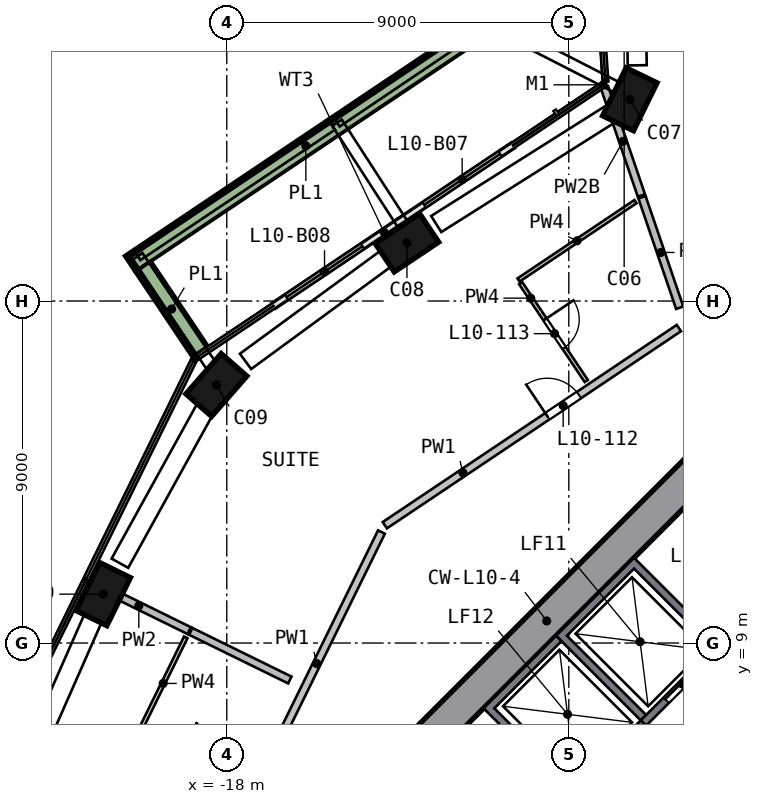
"""IFC4 building model, lengths in metres.
Left out: names, types, materials, properties, quantities, classifications, styles, units other than length and angle.
Written with IfcOpenShell. Run it as: python <this file> out.ifc"""

import sys

from ifc_helpers import new_model, si_unit, direction, frame, frame_2d, origin, origin_2d, place, context, subcontext, project, spatial, polyline, rectangle, outline, extrude, element, fill, save


model = new_model("IFC4")
c1 = context("Model", 3, precision=1e-05, world=origin(), true_north=direction((0.0, 1.0)))
c2 = subcontext(c1, "Body", "Model", "MODEL_VIEW")
j1 = project(units=[si_unit("LENGTHUNIT", "METRE"), si_unit("PLANEANGLEUNIT", "RADIAN")], contexts=[c1])
p1 = place(None, origin())
s1 = spatial("IfcSite", under=j1, at=p1, CompositionType="ELEMENT")
p2 = place(p1, origin())
s2 = spatial("IfcBuilding", under=s1, at=p2, CompositionType="ELEMENT")
p3 = place(p2, frame((0.0, 0.0, 49.5)))
s3 = spatial("IfcBuildingStorey", under=s2, at=p3, CompositionType="ELEMENT", Elevation=49.5)
p4 = place(p3, frame((-7.26, 23.351, 0.0), z_axis=(-0.110754339, -0.035423145, 0.99321633), x_axis=(0.433595077, 0.897517403, 0.080360565)))
e1 = element("IfcColumn", 1, at=p4, inside=s3, PredefinedType="COLUMN", context=c2, shape_type="SweptSolid", body=[
    extrude(rectangle(XDim=1.4, YDim=0.9, at=origin_2d()), origin(), (0.0, 0.0, 1.0), 3.212),
])
p5 = place(p3, frame((-13.147, 19.609, 0.0), z_axis=(-0.092706042, -0.063274346, 0.993681009), x_axis=(-0.825459696, -0.553189961, -0.112237059)))
e2 = element("IfcColumn", 2, at=p5, inside=s3, PredefinedType="COLUMN", context=c2, shape_type="SweptSolid", body=[
    extrude(rectangle(XDim=1.4, YDim=0.9, at=origin_2d()), origin(), (0.0, 0.0, 1.0), 3.21),
])
p6 = place(p3, frame((-18.183, 15.896, 0.0), z_axis=(-0.07488732, -0.087127785, 0.993378396), x_axis=(0.653882627, 0.747822899, 0.114884389)))
e3 = element("IfcColumn", 3, at=p6, inside=s3, PredefinedType="COLUMN", context=c2, shape_type="SweptSolid", body=[
    extrude(rectangle(XDim=1.4, YDim=0.9, at=origin_2d()), origin(), (0.0, 0.0, 1.0), 3.211),
])
p7 = place(p3, frame((-21.19, 10.408, 0.0), z_axis=(-0.048672155, -0.101222872, 0.993672457), x_axis=(-0.438188759, -0.891838808, -0.11231274)))
e4 = element("IfcColumn", 4, at=p7, inside=s3, PredefinedType="COLUMN", context=c2, shape_type="SweptSolid", body=[
    extrude(rectangle(XDim=1.4, YDim=0.9, at=origin_2d()), origin(), (0.0, 0.0, 1.0), 3.21),
])
p8 = place(p3, frame((-5.481, 13.682, 0.0), z_axis=(0.0, 0.0, 1.0), x_axis=(-0.707106781, -0.707106781, 0.0)))
e5 = element("IfcWall", 5, at=p8, inside=s3, PredefinedType="SHEAR", context=c2, shape_type="SweptSolid", body=[
    extrude(rectangle(XDim=11.598, YDim=0.9, at=frame_2d((5.799, 0.0))), origin(), (0.0, 0.0, 1.0), 3.5),
])
p9 = place(p3, frame((-10.477, 22.091, 0.0), z_axis=(0.0, 0.0, 1.0), x_axis=(-0.830597136, -0.556873772, 0.0)))
e6 = element("IfcWall", 6, at=p9, inside=s3, PredefinedType="SOLIDWALL", context=c2, shape_type="SweptSolid", body=[
    extrude(rectangle(XDim=3.6, YDim=0.15, at=frame_2d((1.8, 0.0))), origin(), (0.0, 0.0, 1.0), 2.425),
])
p10 = place(p9, frame((0.4, 0.0, 0.0)))
e7 = element("IfcOpeningElement", 7, at=p10, cuts=e6, PredefinedType="OPENING", context=c2, shape_type="SweptSolid", body=[
    extrude(rectangle(XDim=2.4, YDim=2.4, at=frame_2d((1.2, 1.2))), frame((0.0, 0.085, 0.0), z_axis=(0.0, -1.0, 0.0), x_axis=(1.0, 0.0, 0.0)), (0.0, 0.0, 1.0), 0.17),
])
p11 = place(p3, frame((-13.467, 20.087, 0.0), z_axis=(0.0, 0.0, 1.0), x_axis=(-0.830586929, -0.556888995, 0.0)))
e8 = element("IfcWall", 8, at=p11, inside=s3, PredefinedType="SOLIDWALL", context=c2, shape_type="SweptSolid", body=[
    extrude(rectangle(XDim=3.96, YDim=0.15, at=frame_2d((1.98, 0.0))), origin(), (0.0, 0.0, 1.0), 2.425),
])
p12 = place(p11, frame((1.16, 0.0, 0.0)))
e9 = element("IfcOpeningElement", 9, at=p12, cuts=e8, PredefinedType="OPENING", context=c2, shape_type="SweptSolid", body=[
    extrude(rectangle(XDim=2.4, YDim=2.4, at=frame_2d((1.2, 1.2))), frame((0.0, 0.085, 0.0), z_axis=(0.0, -1.0, 0.0), x_axis=(1.0, 0.0, 0.0)), (0.0, 0.0, 1.0), 0.17),
])
p13 = place(p3, frame((-11.287, 25.19, 0.0), z_axis=(0.0, 0.0, 1.0), x_axis=(-0.830599266, -0.556870595, 0.0)))
e10 = element("IfcWall", 10, at=p13, inside=s3, PredefinedType="SOLIDWALL", context=c2, shape_type="SweptSolid", body=[
    extrude(rectangle(XDim=11.152, YDim=0.5, at=frame_2d((5.576, 0.0))), origin(), (0.0, 0.0, 1.0), 0.7),
])
p14 = place(p3, frame((-20.204, 18.911, 0.0), z_axis=(0.0, 0.0, 1.0), x_axis=(0.556869339, -0.830600108, 0.0)))
e11 = element("IfcWall", 11, at=p14, inside=s3, PredefinedType="SOLIDWALL", context=c2, shape_type="SweptSolid", body=[
    extrude(rectangle(XDim=2.699, YDim=0.5, at=frame_2d((1.35, 0.0))), origin(), (0.0, 0.0, 1.0), 0.7),
])
p15 = place(p3, origin())
e12 = element("IfcWall", 12, at=p15, inside=s3, PredefinedType="SOLIDWALL", context=c2, shape_type="SweptSolid", body=[
    extrude(outline(polyline([(-9.334, 9.192), (-7.283, 11.243), (-5.056, 9.016), (-5.197, 8.874), (-7.283, 10.96), (-9.051, 9.192), (-6.965, 7.106), (-7.106, 6.965), (-9.334, 9.192)])), origin(), (0.0, 0.0, 1.0), 3.19),
])
p16 = place(p3, frame((-4.985, 8.945, 0.0), z_axis=(0.0, 0.0, 1.0), x_axis=(-0.707106781, -0.707106781, 0.0)))
e13 = element("IfcWall", 13, at=p16, inside=s3, PredefinedType="SOLIDWALL", context=c2, shape_type="SweptSolid", body=[
    extrude(rectangle(XDim=2.9, YDim=0.2, at=frame_2d((1.45, 0.0))), origin(), (0.0, 0.0, 1.0), 3.19),
])
p17 = place(p16, frame((0.85, 0.0, 0.0)))
e14 = element("IfcOpeningElement", 14, at=p17, cuts=e13, PredefinedType="OPENING", context=c2, shape_type="SweptSolid", body=[
    extrude(rectangle(XDim=1.2, YDim=2.1, at=frame_2d((0.6, 1.05))), frame((0.0, 0.11, 0.0), z_axis=(0.0, -1.0, 0.0), x_axis=(1.0, 0.0, 0.0)), (0.0, 0.0, 1.0), 0.22),
])
p18 = place(p3, origin())
e15 = element("IfcWall", 15, at=p18, inside=s3, PredefinedType="SOLIDWALL", context=c2, shape_type="SweptSolid", body=[
    extrude(outline(polyline([(-11.243, 7.283), (-9.334, 9.192), (-9.192, 9.051), (-10.96, 7.283), (-8.874, 5.197), (-9.016, 5.056), (-11.243, 7.283)])), origin(), (0.0, 0.0, 1.0), 3.19),
])
p19 = place(p3, frame((-7.036, 6.894, 0.0), z_axis=(0.0, 0.0, 1.0), x_axis=(-0.707106781, -0.707106781, 0.0)))
e16 = element("IfcWall", 16, at=p19, inside=s3, PredefinedType="SOLIDWALL", context=c2, shape_type="SweptSolid", body=[
    extrude(rectangle(XDim=2.7, YDim=0.2, at=frame_2d((1.35, 0.0))), origin(), (0.0, 0.0, 1.0), 3.19),
])
p20 = place(p19, frame((0.65, 0.0, 0.0)))
e17 = element("IfcOpeningElement", 17, at=p20, cuts=e16, PredefinedType="OPENING", context=c2, shape_type="SweptSolid", body=[
    extrude(rectangle(XDim=1.2, YDim=2.1, at=frame_2d((0.6, 1.05))), frame((0.0, 0.11, 0.0), z_axis=(0.0, -1.0, 0.0), x_axis=(1.0, 0.0, 0.0)), (0.0, 0.0, 1.0), 0.22),
])
p21 = place(p3, frame((-2.864, 6.823, 0.0), z_axis=(0.0, 0.0, 1.0), x_axis=(-0.707106781, -0.707106781, 0.0)))
e18 = element("IfcWall", 18, at=p21, inside=s3, PredefinedType="SOLIDWALL", context=c2, shape_type="SweptSolid", body=[
    extrude(rectangle(XDim=5.6, YDim=0.2, at=frame_2d((2.8, 0.0))), origin(), (0.0, 0.0, 1.0), 3.19),
])
p22 = place(p21, frame((2.2, 0.0, 0.0)))
e19 = element("IfcOpeningElement", 19, at=p22, cuts=e18, PredefinedType="OPENING", context=c2, shape_type="SweptSolid", body=[
    extrude(rectangle(XDim=1.2, YDim=2.1, at=frame_2d((0.6, 1.05))), frame((0.0, 0.11, 0.0), z_axis=(0.0, -1.0, 0.0), x_axis=(1.0, 0.0, 0.0)), (0.0, 0.0, 1.0), 0.22),
])
p23 = place(p3, frame((-17.949, 3.738, 0.0), z_axis=(0.0, 0.0, 1.0), x_axis=(0.440892524, 0.897559905, 0.0)))
e20 = element("IfcWall", 20, at=p23, inside=s3, PredefinedType="SOLIDWALL", context=c2, shape_type="SweptSolid", body=[
    extrude(rectangle(XDim=9.116, YDim=0.2, at=frame_2d((4.558, 0.0))), origin(), (0.0, 0.0, 1.0), 3.19),
])
p24 = place(p23, frame((0.2, 0.0, 0.0)))
e21 = element("IfcOpeningElement", 21, at=p24, cuts=e20, PredefinedType="OPENING", context=c2, shape_type="SweptSolid", body=[
    extrude(rectangle(XDim=1.0, YDim=2.1, at=frame_2d((0.5, 1.05))), frame((0.0, 0.11, 0.0), z_axis=(0.0, -1.0, 0.0), x_axis=(1.0, 0.0, 0.0)), (0.0, 0.0, 1.0), 0.22),
])
p25 = place(p3, frame((-13.841, 12.101, 0.0), z_axis=(0.0, 0.0, 1.0), x_axis=(0.830608164, 0.556857323, 0.0)))
e22 = element("IfcWall", 22, at=p25, inside=s3, PredefinedType="SOLIDWALL", context=c2, shape_type="SweptSolid", body=[
    extrude(rectangle(XDim=9.316, YDim=0.2, at=frame_2d((4.658, 0.0))), origin(), (0.0, 0.0, 1.0), 3.19),
])
p26 = place(p25, frame((5.15, 0.0, 0.0)))
e23 = element("IfcOpeningElement", 23, at=p26, cuts=e22, PredefinedType="OPENING", context=c2, shape_type="SweptSolid", body=[
    extrude(rectangle(XDim=1.0, YDim=2.1, at=frame_2d((0.5, 1.05))), frame((0.0, 0.11, 0.0), z_axis=(0.0, -1.0, 0.0), x_axis=(1.0, 0.0, 0.0)), (0.0, 0.0, 1.0), 0.22),
])
p27 = place(p3, frame((-18.989, 9.327, 0.0), z_axis=(0.0, 0.0, 1.0), x_axis=(-0.897564087, 0.440884009, 0.0)))
e24 = element("IfcWall", 24, at=p27, inside=s3, PredefinedType="SOLIDWALL", context=c2, shape_type="SweptSolid", body=[
    extrude(rectangle(XDim=2.952, YDim=0.2, at=frame_2d((1.476, 0.0))), origin(), (0.0, 0.0, 1.0), 3.19),
])
p28 = place(p3, frame((-16.341, 8.027, 0.0), z_axis=(0.0, 0.0, 1.0), x_axis=(-0.897581751, 0.440848046, 0.0)))
e25 = element("IfcWall", 25, at=p28, inside=s3, PredefinedType="SOLIDWALL", context=c2, shape_type="SweptSolid", body=[
    extrude(rectangle(XDim=2.905, YDim=0.2, at=frame_2d((1.452, 0.0))), origin(), (0.0, 0.0, 1.0), 3.19),
])
p29 = place(p3, frame((-7.089, 20.777, 0.0), z_axis=(0.0, 0.0, 1.0), x_axis=(-0.322908317, 0.946430251, 0.0)))
e26 = element("IfcWall", 26, at=p29, inside=s3, PredefinedType="SOLIDWALL", context=c2, shape_type="SweptSolid", body=[
    extrude(rectangle(XDim=3.011, YDim=0.2, at=frame_2d((1.506, 0.0))), origin(), (0.0, 0.0, 1.0), 2.69),
])
p30 = place(p3, frame((-6.081, 17.823, 0.0), z_axis=(0.0, 0.0, 1.0), x_axis=(-0.322937445, 0.946420312, 0.0)))
e27 = element("IfcWall", 27, at=p30, inside=s3, PredefinedType="SOLIDWALL", context=c2, shape_type="SweptSolid", body=[
    extrude(rectangle(XDim=3.075, YDim=0.2, at=frame_2d((1.537, 0.0))), origin(), (0.0, 0.0, 1.0), 3.19),
])
p31 = place(p3, frame((-20.27, 6.725, 0.0), z_axis=(0.0, 0.0, 1.0), x_axis=(0.440908992, 0.897551815, 0.0)))
e28 = element("IfcWall", 28, at=p31, inside=s3, PredefinedType="PARTITIONING", context=c2, shape_type="SweptSolid", body=[
    extrude(rectangle(XDim=2.7, YDim=0.1, at=frame_2d((1.35, 0.0))), origin(), (0.0, 0.0, 1.0), 3.19),
])
p32 = place(p3, frame((-10.266, 18.47, 0.0), z_axis=(0.0, 0.0, 1.0), x_axis=(0.556860995, -0.830605702, 0.0)))
e29 = element("IfcWall", 29, at=p32, inside=s3, PredefinedType="PARTITIONING", context=c2, shape_type="SweptSolid", body=[
    extrude(rectangle(XDim=3.1, YDim=0.1, at=frame_2d((1.55, 0.0))), origin(), (0.0, 0.0, 1.0), 3.19),
])
p33 = place(p32, frame((1.15, 0.0, 0.0)))
e30 = element("IfcOpeningElement", 30, at=p33, cuts=e29, PredefinedType="OPENING", context=c2, shape_type="SweptSolid", body=[
    extrude(rectangle(XDim=0.9, YDim=2.1, at=frame_2d((0.45, 1.05))), frame((0.0, 0.06, 0.0), z_axis=(0.0, -1.0, 0.0), x_axis=(1.0, 0.0, 0.0)), (0.0, 0.0, 1.0), 0.12),
])
p34 = place(p3, frame((-10.322, 18.553, 0.0), z_axis=(0.0, 0.0, 1.0), x_axis=(0.83060748, 0.556858344, 0.0)))
e31 = element("IfcWall", 31, at=p34, inside=s3, PredefinedType="PARTITIONING", context=c2, shape_type="SweptSolid", body=[
    extrude(rectangle(XDim=3.704, YDim=0.1, at=frame_2d((1.852, 0.0))), origin(), (0.0, 0.0, 1.0), 3.19),
])
p35 = place(p10, origin())
e32 = element("IfcDoor", 32, at=p35, inside=s3, OperationType="SLIDING_TO_RIGHT", PredefinedType="DOOR", context=c2, shape_type="SweptSolid", body=[
    extrude(rectangle(XDim=2.4, YDim=2.4, at=frame_2d((1.2, 1.2))), frame((0.0, 0.025, 0.0), z_axis=(0.0, -1.0, 0.0), x_axis=(1.0, 0.0, 0.0)), (0.0, 0.0, 1.0), 0.05),
])
fill(e7, e32)
p36 = place(p12, origin())
e33 = element("IfcDoor", 33, at=p36, inside=s3, OperationType="SLIDING_TO_LEFT", PredefinedType="DOOR", context=c2, shape_type="SweptSolid", body=[
    extrude(rectangle(XDim=2.4, YDim=2.4, at=frame_2d((1.2, 1.2))), frame((0.0, 0.025, 0.0), z_axis=(0.0, -1.0, 0.0), x_axis=(1.0, 0.0, 0.0)), (0.0, 0.0, 1.0), 0.05),
])
fill(e9, e33)
p37 = place(p17, origin())
e34 = element("IfcDoor", 34, at=p37, inside=s3, OperationType="DOUBLE_DOOR_SLIDING", PredefinedType="DOOR", context=c2, shape_type="SweptSolid", body=[
    extrude(rectangle(XDim=1.2, YDim=2.1, at=frame_2d((0.6, 1.05))), frame((0.0, 0.025, 0.0), z_axis=(0.0, -1.0, 0.0), x_axis=(1.0, 0.0, 0.0)), (0.0, 0.0, 1.0), 0.05),
])
fill(e14, e34)
p38 = place(p26, origin())
e35 = element("IfcDoor", 35, at=p38, inside=s3, OperationType="SINGLE_SWING_LEFT", PredefinedType="DOOR", context=c2, shape_type="SweptSolid", body=[
    extrude(rectangle(XDim=1.0, YDim=2.1, at=frame_2d((0.5, 1.05))), frame((0.0, 0.025, 0.0), z_axis=(0.0, -1.0, 0.0), x_axis=(1.0, 0.0, 0.0)), (0.0, 0.0, 1.0), 0.05),
])
fill(e23, e35)
p39 = place(p33, origin())
e36 = element("IfcDoor", 36, at=p39, inside=s3, OperationType="SINGLE_SWING_LEFT", PredefinedType="DOOR", context=c2, shape_type="SweptSolid", body=[
    extrude(rectangle(XDim=0.9, YDim=2.1, at=frame_2d((0.45, 1.05))), frame((0.0, 0.025, 0.0), z_axis=(0.0, -1.0, 0.0), x_axis=(1.0, 0.0, 0.0)), (0.0, 0.0, 1.0), 0.05),
])
fill(e30, e36)
save(model, sys.argv[1])
